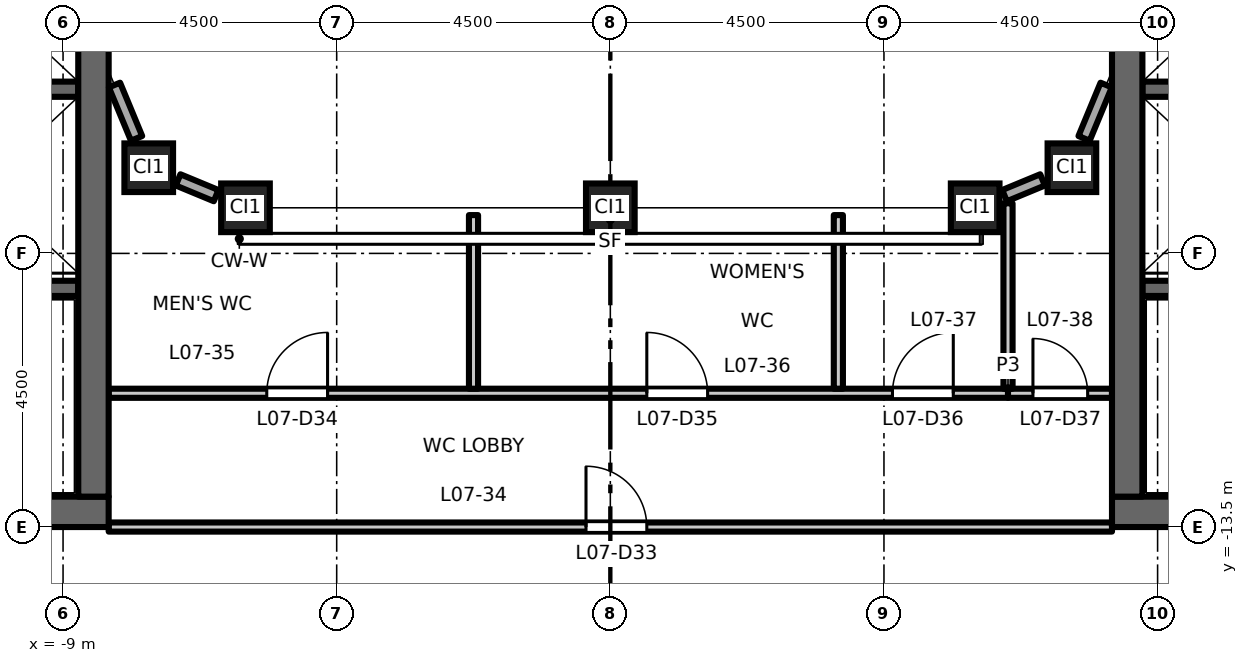
"""IFC4 building model, lengths in metres.
Left out: names, types, materials, properties, quantities, classifications, styles, units other than length and angle.
Written with IfcOpenShell. Run it as: python <this file> out.ifc"""

import sys

from ifc_helpers import new_model, si_unit, direction, frame, frame_2d, origin, origin_2d, place, context, subcontext, project, spatial, rectangle, hollow_rectangle, extrude, element, fill, save


model = new_model("IFC4")
c1 = context("Model", 3, precision=1e-05, world=origin(), true_north=direction((0.0, 1.0)))
c2 = subcontext(c1, "Body", "Model", "MODEL_VIEW")
j1 = project(units=[si_unit("LENGTHUNIT", "METRE"), si_unit("PLANEANGLEUNIT", "RADIAN")], contexts=[c1])
p1 = place(None, origin())
s1 = spatial("IfcSite", under=j1, at=p1, CompositionType="ELEMENT")
p2 = place(p1, origin())
s2 = spatial("IfcBuilding", under=s1, at=p2, CompositionType="ELEMENT")
p3 = place(p2, frame((0.0, 0.0, 35.7)))
s3 = spatial("IfcBuildingStorey", under=s2, at=p3, CompositionType="ELEMENT", Elevation=35.7)
for number, where, z_axis, x_axis in (
    (1, (-7.591, -7.591, 0.0), (0.0, 0.0, 1.0), (1.0, 0.0, 0.0)),
    (2, (-6.0, -8.25, 0.0), (0.0, 0.0, 1.0), (1.0, 0.0, 0.0)),
    (3, (0.0, -8.25, 0.0), (0.0, 0.0, 1.0), (1.0, 0.0, 0.0)),
    (4, (6.0, -8.25, 0.0), (0.0, 0.0, 1.0), (1.0, 0.0, 0.0)),
    (5, (7.591, -7.591, 0.0), (0.0, 0.0, 1.0), (1.0, 0.0, 0.0)),
):
    element("IfcColumn", number, at=place(p3, frame(where, z_axis=z_axis, x_axis=x_axis)), inside=s3, PredefinedType="COLUMN", context=c2, shape_type="SweptSolid", body=[
        extrude(hollow_rectangle(XDim=0.8, YDim=0.8, WallThickness=0.05, at=origin_2d()), origin(), (0.0, 0.0, 1.0), 4.5),
    ])
p4 = place(p3, frame((-8.75, -6.3, 0.0), z_axis=(0.0, 0.0, 1.0), x_axis=(-1.0, 0.0, 0.0)))
e6 = element("IfcWall", 6, at=p4, inside=s3, PredefinedType="SHEAR", context=c2, shape_type="SweptSolid", body=[
    extrude(rectangle(XDim=3.1, YDim=0.25, at=frame_2d((1.55, 0.0))), origin(), (0.0, 0.0, 1.0), 4.35),
])
p5 = place(p3, frame((-8.75, -9.575, 0.0), z_axis=(0.0, 0.0, 1.0), x_axis=(-1.0, 0.0, 0.0)))
e7 = element("IfcWall", 7, at=p5, inside=s3, PredefinedType="SHEAR", context=c2, shape_type="SweptSolid", body=[
    extrude(rectangle(XDim=8.0, YDim=0.25, at=frame_2d((4.0, 0.0))), origin(), (0.0, 0.0, 1.0), 4.35),
])
p6 = place(p5, frame((6.65, 0.0, 0.0)))
e8 = element("IfcOpeningElement", 8, at=p6, cuts=e7, PredefinedType="OPENING", context=c2, shape_type="SweptSolid", body=[
    extrude(rectangle(XDim=1.1, YDim=2.1, at=frame_2d((0.55, 1.05))), frame((0.0, 0.135, 0.0), z_axis=(0.0, -1.0, 0.0), x_axis=(1.0, 0.0, 0.0)), (0.0, 0.0, 1.0), 0.27),
])
p7 = place(p3, frame((-8.25, -13.25, 0.0), z_axis=(0.0, 0.0, 1.0), x_axis=(-1.0, 0.0, 0.0)))
e9 = element("IfcWall", 9, at=p7, inside=s3, PredefinedType="SHEAR", context=c2, shape_type="SweptSolid", body=[
    extrude(rectangle(XDim=13.5, YDim=0.5, at=frame_2d((6.75, 0.0))), origin(), (0.0, 0.0, 1.0), 4.35),
])
p8 = place(p3, frame((-8.5, -13.0, 0.0), z_axis=(0.0, 0.0, 1.0), x_axis=(0.0, 1.0, 0.0)))
e10 = element("IfcWall", 10, at=p8, inside=s3, PredefinedType="SHEAR", context=c2, shape_type="SweptSolid", body=[
    extrude(rectangle(XDim=26.0, YDim=0.5, at=frame_2d((13.0, 0.0))), origin(), (0.0, 0.0, 1.0), 4.35),
])
p9 = place(p3, frame((8.75, -6.3, 0.0), z_axis=(0.0, 0.0, 1.0), x_axis=(1.0, 0.0, 0.0)))
e11 = element("IfcWall", 11, at=p9, inside=s3, PredefinedType="SHEAR", context=c2, shape_type="SweptSolid", body=[
    extrude(rectangle(XDim=3.1, YDim=0.25, at=frame_2d((1.55, 0.0))), origin(), (0.0, 0.0, 1.0), 4.35),
])
p10 = place(p3, frame((8.75, -9.575, 0.0), z_axis=(0.0, 0.0, 1.0), x_axis=(1.0, 0.0, 0.0)))
e12 = element("IfcWall", 12, at=p10, inside=s3, PredefinedType="SHEAR", context=c2, shape_type="SweptSolid", body=[
    extrude(rectangle(XDim=8.0, YDim=0.25, at=frame_2d((4.0, 0.0))), origin(), (0.0, 0.0, 1.0), 4.35),
])
p11 = place(p10, frame((6.65, 0.0, 0.0)))
e13 = element("IfcOpeningElement", 13, at=p11, cuts=e12, PredefinedType="OPENING", context=c2, shape_type="SweptSolid", body=[
    extrude(rectangle(XDim=1.1, YDim=2.1, at=frame_2d((0.55, 1.05))), frame((0.0, 0.135, 0.0), z_axis=(0.0, -1.0, 0.0), x_axis=(1.0, 0.0, 0.0)), (0.0, 0.0, 1.0), 0.27),
])
p12 = place(p3, frame((8.25, -13.25, 0.0), z_axis=(0.0, 0.0, 1.0), x_axis=(1.0, 0.0, 0.0)))
e14 = element("IfcWall", 14, at=p12, inside=s3, PredefinedType="SHEAR", context=c2, shape_type="SweptSolid", body=[
    extrude(rectangle(XDim=13.5, YDim=0.5, at=frame_2d((6.75, 0.0))), origin(), (0.0, 0.0, 1.0), 4.35),
])
p13 = place(p3, frame((8.5, -13.0, 0.0), z_axis=(0.0, 0.0, 1.0), x_axis=(0.0, 1.0, 0.0)))
e15 = element("IfcWall", 15, at=p13, inside=s3, PredefinedType="SHEAR", context=c2, shape_type="SweptSolid", body=[
    extrude(rectangle(XDim=26.0, YDim=0.5, at=frame_2d((13.0, 0.0))), origin(), (0.0, 0.0, 1.0), 4.35),
])
p14 = place(p3, frame((6.483, -8.05, 0.0), z_axis=(0.0, 0.0, 1.0), x_axis=(0.923854141361, 0.382744726273, 0.0)))
e16 = element("IfcWall", 16, at=p14, inside=s3, PredefinedType="STANDARD", context=c2, shape_type="SweptSolid", body=[
    extrude(rectangle(XDim=0.677, YDim=0.2, at=frame_2d((0.338, 0.0))), origin(), (0.0, 0.0, 1.0), 3.73),
])
for number, where, z_axis, x_axis in (
    (17, (7.791, -7.108, 0.0), (0.0, 0.0, 1.0), (0.383, 0.924, 0.0)),
    (18, (-8.154, -6.231, 0.0), (0.0, 0.0, 1.0), (0.383, -0.924, 0.0)),
):
    element("IfcWall", number, at=place(p3, frame(where, z_axis=z_axis, x_axis=x_axis)), inside=s3, PredefinedType="STANDARD", context=c2, shape_type="SweptSolid", body=[
        extrude(rectangle(XDim=0.949, YDim=0.2, at=frame_2d((0.475, 0.0))), origin(), (0.0, 0.0, 1.0), 3.73),
    ])
p15 = place(p3, frame((-7.108, -7.791, 0.0), z_axis=(0.0, 0.0, 1.0), x_axis=(0.923854141361, -0.382744726273, 0.0)))
e19 = element("IfcWall", 19, at=p15, inside=s3, PredefinedType="STANDARD", context=c2, shape_type="SweptSolid", body=[
    extrude(rectangle(XDim=0.677, YDim=0.2, at=frame_2d((0.338, 0.0))), origin(), (0.0, 0.0, 1.0), 3.73),
])
p16 = place(p3, frame((-8.25, -13.5, 0.0), z_axis=(0.0, 0.0, 1.0), x_axis=(1.0, 0.0, 0.0)))
e20 = element("IfcWall", 20, at=p16, inside=s3, PredefinedType="PARTITIONING", context=c2, shape_type="SweptSolid", body=[
    extrude(rectangle(XDim=16.5, YDim=0.15, at=frame_2d((8.25, 0.0))), origin(), (0.0, 0.0, 1.0), 3.85),
])
p17 = place(p16, frame((7.85, 0.0, 0.0)))
e21 = element("IfcOpeningElement", 21, at=p17, cuts=e20, PredefinedType="OPENING", context=c2, shape_type="SweptSolid", body=[
    extrude(rectangle(XDim=1.0, YDim=2.1, at=frame_2d((0.5, 1.05))), frame((0.0, 0.085, 0.0), z_axis=(0.0, -1.0, 0.0), x_axis=(1.0, 0.0, 0.0)), (0.0, 0.0, 1.0), 0.17),
])
p18 = place(p3, frame((-8.25, -11.3, 0.0), z_axis=(0.0, 0.0, 1.0), x_axis=(1.0, 0.0, 0.0)))
e22 = element("IfcWall", 22, at=p18, inside=s3, PredefinedType="PARTITIONING", context=c2, shape_type="SweptSolid", body=[
    extrude(rectangle(XDim=14.79, YDim=0.15, at=frame_2d((7.395, 0.0))), origin(), (0.0, 0.0, 1.0), 4.35),
])
p19 = place(p18, frame((2.6, 0.0, 0.0)))
e23 = element("IfcOpeningElement", 23, at=p19, cuts=e22, PredefinedType="OPENING", context=c2, shape_type="SweptSolid", body=[
    extrude(rectangle(XDim=1.0, YDim=2.1, at=frame_2d((0.5, 1.05))), frame((0.0, 0.085, 0.0), z_axis=(0.0, -1.0, 0.0), x_axis=(1.0, 0.0, 0.0)), (0.0, 0.0, 1.0), 0.17),
])
p20 = place(p18, frame((8.85, 0.0, 0.0)))
e24 = element("IfcOpeningElement", 24, at=p20, cuts=e22, PredefinedType="OPENING", context=c2, shape_type="SweptSolid", body=[
    extrude(rectangle(XDim=1.0, YDim=2.1, at=frame_2d((0.5, 1.05))), frame((0.0, 0.085, 0.0), z_axis=(0.0, -1.0, 0.0), x_axis=(1.0, 0.0, 0.0)), (0.0, 0.0, 1.0), 0.17),
])
p21 = place(p18, frame((12.89, 0.0, 0.0)))
e25 = element("IfcOpeningElement", 25, at=p21, cuts=e22, PredefinedType="OPENING", context=c2, shape_type="SweptSolid", body=[
    extrude(rectangle(XDim=1.0, YDim=2.1, at=frame_2d((0.5, 1.05))), frame((0.0, 0.085, 0.0), z_axis=(0.0, -1.0, 0.0), x_axis=(1.0, 0.0, 0.0)), (0.0, 0.0, 1.0), 0.17),
])
p22 = place(p3, frame((6.54, -11.3, 0.0), z_axis=(0.0, 0.0, 1.0), x_axis=(1.0, 0.0, 0.0)))
e26 = element("IfcWall", 26, at=p22, inside=s3, PredefinedType="PARTITIONING", context=c2, shape_type="SweptSolid", body=[
    extrude(rectangle(XDim=1.71, YDim=0.15, at=frame_2d((0.855, 0.0))), origin(), (0.0, 0.0, 1.0), 4.35),
])
p23 = place(p22, frame((0.41, 0.0, 0.0)))
e27 = element("IfcOpeningElement", 27, at=p23, cuts=e26, PredefinedType="OPENING", context=c2, shape_type="SweptSolid", body=[
    extrude(rectangle(XDim=0.9, YDim=2.1, at=frame_2d((0.45, 1.05))), frame((0.0, 0.085, 0.0), z_axis=(0.0, -1.0, 0.0), x_axis=(1.0, 0.0, 0.0)), (0.0, 0.0, 1.0), 0.17),
])
for number, where, z_axis, x_axis in (
    (28, (-2.25, -11.225, 0.0), (0.0, 0.0, 1.0), (0.0, 1.0, 0.0)),
    (29, (3.75, -11.225, 0.0), (0.0, 0.0, 1.0), (0.0, 1.0, 0.0)),
):
    element("IfcWall", number, at=place(p3, frame(where, z_axis=z_axis, x_axis=x_axis)), inside=s3, PredefinedType="PARTITIONING", context=c2, shape_type="SweptSolid", body=[
        extrude(rectangle(XDim=2.855, YDim=0.15, at=frame_2d((1.427, 0.0))), origin(), (0.0, 0.0, 1.0), 4.35),
    ])
p24 = place(p3, frame((6.54, -11.225, 0.0), z_axis=(0.0, 0.0, 1.0), x_axis=(0.0, 1.0, 0.0)))
e30 = element("IfcWall", 30, at=p24, inside=s3, PredefinedType="PARTITIONING", context=c2, shape_type="SweptSolid", body=[
    extrude(rectangle(XDim=3.049, YDim=0.15, at=frame_2d((1.524, 0.0))), origin(), (0.0, 0.0, 1.0), 4.35),
])
p25 = place(p17, origin())
e31 = element("IfcDoor", 31, at=p25, inside=s3, OperationType="SINGLE_SWING_LEFT", PredefinedType="DOOR", context=c2, shape_type="SweptSolid", body=[
    extrude(rectangle(XDim=1.0, YDim=2.1, at=frame_2d((0.5, 1.05))), frame((0.0, 0.025, 0.0), z_axis=(0.0, -1.0, 0.0), x_axis=(1.0, 0.0, 0.0)), (0.0, 0.0, 1.0), 0.05),
])
fill(e21, e31)
p26 = place(p19, origin())
e32 = element("IfcDoor", 32, at=p26, inside=s3, OperationType="SINGLE_SWING_RIGHT", PredefinedType="DOOR", context=c2, shape_type="SweptSolid", body=[
    extrude(rectangle(XDim=1.0, YDim=2.1, at=frame_2d((0.5, 1.05))), frame((0.0, 0.025, 0.0), z_axis=(0.0, -1.0, 0.0), x_axis=(1.0, 0.0, 0.0)), (0.0, 0.0, 1.0), 0.05),
])
fill(e23, e32)
p27 = place(p20, origin())
e33 = element("IfcDoor", 33, at=p27, inside=s3, OperationType="SINGLE_SWING_LEFT", PredefinedType="DOOR", context=c2, shape_type="SweptSolid", body=[
    extrude(rectangle(XDim=1.0, YDim=2.1, at=frame_2d((0.5, 1.05))), frame((0.0, 0.025, 0.0), z_axis=(0.0, -1.0, 0.0), x_axis=(1.0, 0.0, 0.0)), (0.0, 0.0, 1.0), 0.05),
])
fill(e24, e33)
p28 = place(p21, origin())
e34 = element("IfcDoor", 34, at=p28, inside=s3, OperationType="SINGLE_SWING_RIGHT", PredefinedType="DOOR", context=c2, shape_type="SweptSolid", body=[
    extrude(rectangle(XDim=1.0, YDim=2.1, at=frame_2d((0.5, 1.05))), frame((0.0, 0.025, 0.0), z_axis=(0.0, -1.0, 0.0), x_axis=(1.0, 0.0, 0.0)), (0.0, 0.0, 1.0), 0.05),
])
fill(e25, e34)
p29 = place(p23, origin())
e35 = element("IfcDoor", 35, at=p29, inside=s3, OperationType="SINGLE_SWING_LEFT", PredefinedType="DOOR", context=c2, shape_type="SweptSolid", body=[
    extrude(rectangle(XDim=0.9, YDim=2.1, at=frame_2d((0.45, 1.05))), frame((0.0, 0.025, 0.0), z_axis=(0.0, -1.0, 0.0), x_axis=(1.0, 0.0, 0.0)), (0.0, 0.0, 1.0), 0.05),
])
fill(e27, e35)
save(model, sys.argv[1])
